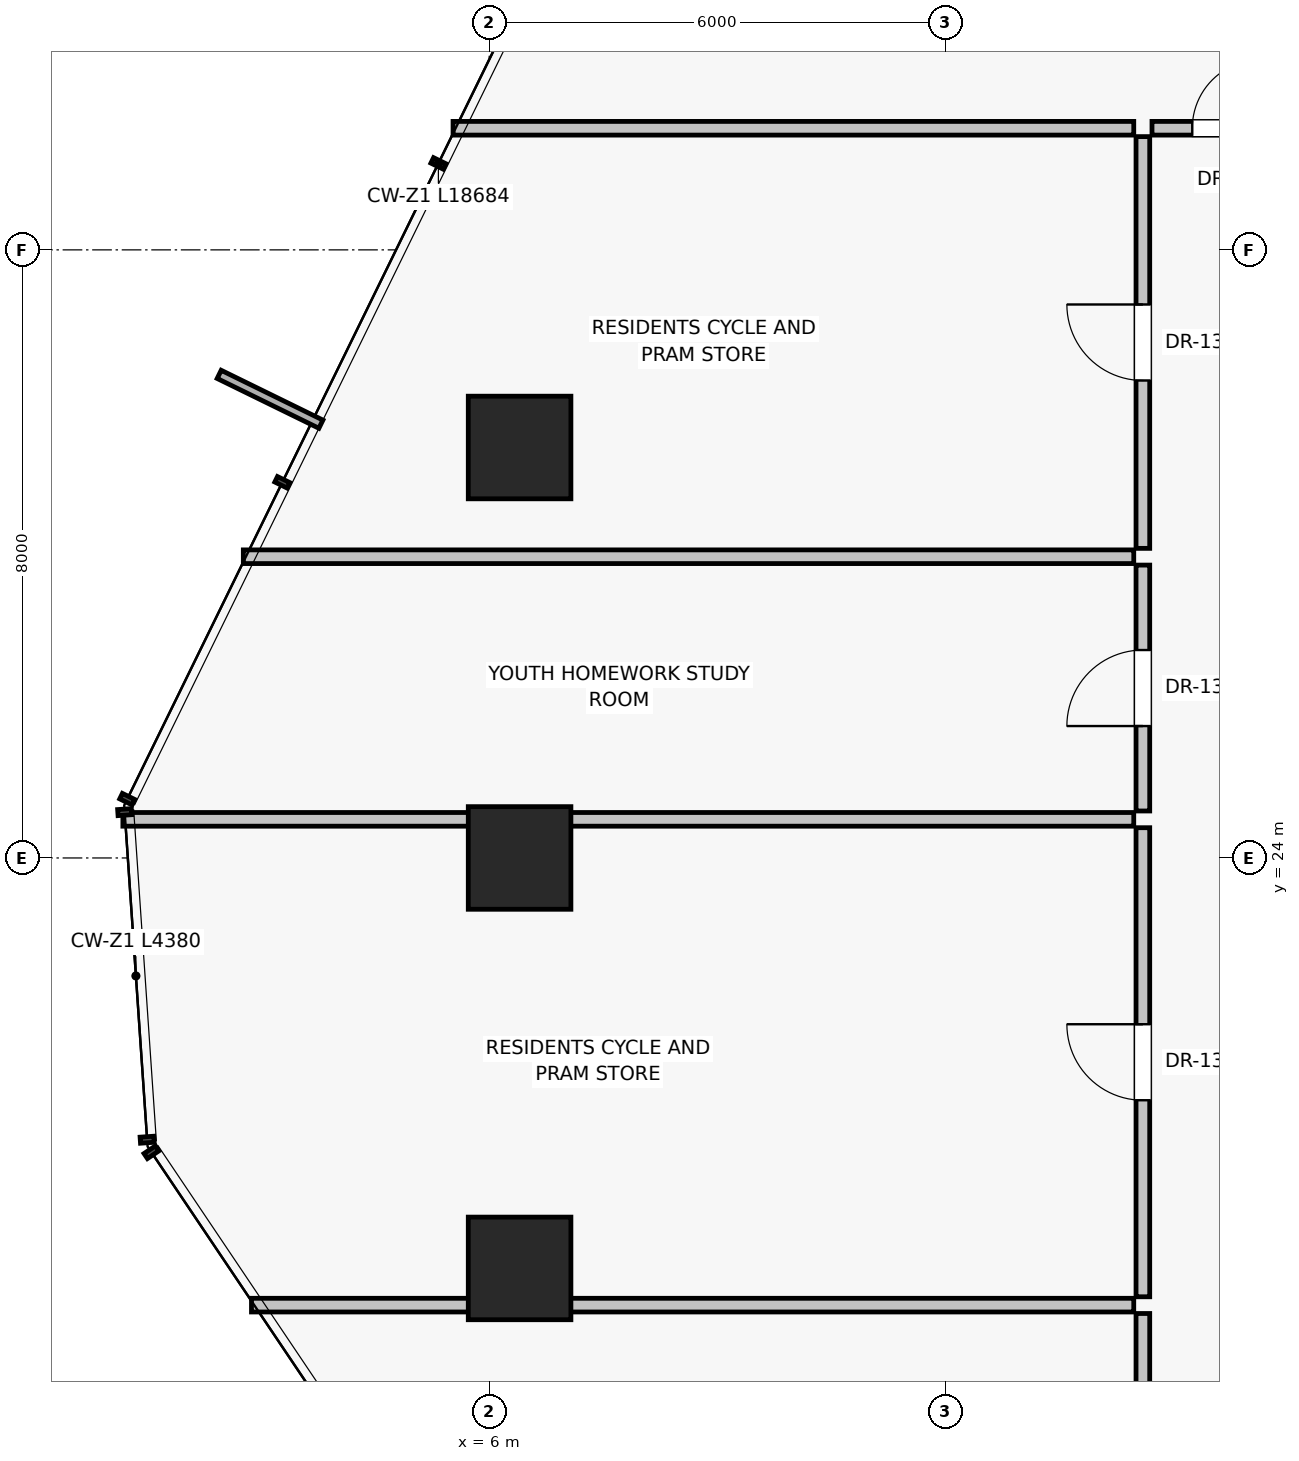
"""IFC4 building model, lengths in metres.
Left out: names, types, materials, properties, quantities, classifications, styles, units other than length and angle.
Written with IfcOpenShell. Run it as: python <this file> out.ifc"""

import sys

from ifc_helpers import new_model, si_unit, direction, frame, frame_2d, origin, origin_2d, place, context, subcontext, project, spatial, rectangle, extrude, source, transform, mapped, element, fill, save


model = new_model("IFC4")
c1 = context("Model", 3, precision=1e-05, world=origin(), true_north=direction((0.0, 1.0)))
c2 = subcontext(c1, "Body", "Model", "MODEL_VIEW")
j1 = project(units=[si_unit("LENGTHUNIT", "METRE"), si_unit("PLANEANGLEUNIT", "RADIAN")], contexts=[c1])
p1 = place(None, origin())
s1 = spatial("IfcSite", under=j1, at=p1, CompositionType="ELEMENT")
p2 = place(p1, origin())
s2 = spatial("IfcBuilding", under=s1, at=p2, CompositionType="ELEMENT")
p3 = place(p2, frame((0.0, 0.0, 37.05)))
s3 = spatial("IfcBuildingStorey", under=s2, at=p3, CompositionType="ELEMENT", Elevation=37.05)
for number, where, z_axis, x_axis in (
    (1, (6.4, 29.4, 0.0), (0.0, 0.0, 1.0), (1.0, 0.0, 0.0)),
    (2, (6.4, 24.0, 0.0), (0.0, 0.0, 1.0), (1.0, 0.0, 0.0)),
    (3, (6.4, 18.6, 0.0), (0.0, 0.0, 1.0), (1.0, 0.0, 0.0)),
):
    element("IfcColumn", number, at=place(p3, frame(where, z_axis=z_axis, x_axis=x_axis)), inside=s3, PredefinedType="COLUMN", context=c2, shape_type="SweptSolid", body=[
        extrude(rectangle(XDim=1.35, YDim=1.35, at=origin_2d()), origin(), (0.0, 0.0, 1.0), 3.25),
    ])
p4 = place(p3, frame((14.48, 33.6, 0.0), z_axis=(0.0, 0.0, 1.0), x_axis=(-1.0, 0.0, 0.0)))
e4 = element("IfcWall", 4, at=p4, inside=s3, PredefinedType="PARTITIONING", context=c2, shape_type="SweptSolid", body=[
    extrude(rectangle(XDim=8.955, YDim=0.18, at=frame_2d((4.478, 0.0))), origin(), (0.0, 0.0, 1.0), 3.0),
])
p5 = place(p3, frame((14.6, 14.31, 0.0), z_axis=(0.0, 0.0, 1.0), x_axis=(0.0, 1.0, 0.0)))
e5 = element("IfcWall", 5, at=p5, inside=s3, PredefinedType="PARTITIONING", context=c2, shape_type="SweptSolid", body=[
    extrude(rectangle(XDim=3.697, YDim=0.18, at=frame_2d((1.849, 0.0))), origin(), (0.0, 0.0, 1.0), 3.0),
])
p6 = place(p5, frame((1.348, 0.0, 0.0)))
e6 = element("IfcOpeningElement", 6, at=p6, cuts=e5, PredefinedType="OPENING", context=c2, shape_type="SweptSolid", body=[
    extrude(rectangle(XDim=1.0, YDim=2.01, at=frame_2d((0.5, 1.005))), frame((0.0, 0.1, 0.0), z_axis=(0.0, -1.0, 0.0), x_axis=(1.0, 0.0, 0.0)), (0.0, 0.0, 1.0), 0.2),
])
p7 = place(p3, frame((14.6, 18.227, 0.0), z_axis=(0.0, 0.0, 1.0), x_axis=(0.0, 1.0, 0.0)))
e7 = element("IfcWall", 7, at=p7, inside=s3, PredefinedType="PARTITIONING", context=c2, shape_type="SweptSolid", body=[
    extrude(rectangle(XDim=6.171, YDim=0.18, at=frame_2d((3.085, 0.0))), origin(), (0.0, 0.0, 1.0), 3.0),
])
p8 = place(p7, frame((2.585, 0.0, 0.0)))
e8 = element("IfcOpeningElement", 8, at=p8, cuts=e7, PredefinedType="OPENING", context=c2, shape_type="SweptSolid", body=[
    extrude(rectangle(XDim=1.0, YDim=2.01, at=frame_2d((0.5, 1.005))), frame((0.0, 0.1, 0.0), z_axis=(0.0, -1.0, 0.0), x_axis=(1.0, 0.0, 0.0)), (0.0, 0.0, 1.0), 0.2),
])
p9 = place(p3, frame((14.48, 18.117, 0.0), z_axis=(0.0, 0.0, 1.0), x_axis=(-1.0, 0.0, 0.0)))
e9 = element("IfcWall", 9, at=p9, inside=s3, PredefinedType="PARTITIONING", context=c2, shape_type="SweptSolid", body=[
    extrude(rectangle(XDim=11.607, YDim=0.18, at=frame_2d((5.804, 0.0))), origin(), (0.0, 0.0, 1.0), 2.299),
])
p10 = place(p3, frame((14.48, 24.508, 0.0), z_axis=(0.0, 0.0, 1.0), x_axis=(-1.0, 0.0, 0.0)))
e10 = element("IfcWall", 10, at=p10, inside=s3, PredefinedType="PARTITIONING", context=c2, shape_type="SweptSolid", body=[
    extrude(rectangle(XDim=13.299, YDim=0.18, at=frame_2d((6.649, 0.0))), origin(), (0.0, 0.0, 1.0), 3.0),
])
p11 = place(p3, frame((14.6, 24.618, 0.0), z_axis=(0.0, 0.0, 1.0), x_axis=(0.0, 1.0, 0.0)))
e11 = element("IfcWall", 11, at=p11, inside=s3, PredefinedType="PARTITIONING", context=c2, shape_type="SweptSolid", body=[
    extrude(rectangle(XDim=3.235, YDim=0.18, at=frame_2d((1.618, 0.0))), origin(), (0.0, 0.0, 1.0), 3.0),
])
p12 = place(p11, frame((1.117, 0.0, 0.0)))
e12 = element("IfcOpeningElement", 12, at=p12, cuts=e11, PredefinedType="OPENING", context=c2, shape_type="SweptSolid", body=[
    extrude(rectangle(XDim=1.0, YDim=2.01, at=frame_2d((0.5, 1.005))), frame((0.0, 0.1, 0.0), z_axis=(0.0, -1.0, 0.0), x_axis=(1.0, 0.0, 0.0)), (0.0, 0.0, 1.0), 0.2),
])
p13 = place(p3, frame((14.6, 28.073, 0.0), z_axis=(0.0, 0.0, 1.0), x_axis=(0.0, 1.0, 0.0)))
e13 = element("IfcWall", 13, at=p13, inside=s3, PredefinedType="PARTITIONING", context=c2, shape_type="SweptSolid", body=[
    extrude(rectangle(XDim=5.417, YDim=0.18, at=frame_2d((2.708, 0.0))), origin(), (0.0, 0.0, 1.0), 3.0),
])
p14 = place(p13, frame((2.208, 0.0, 0.0)))
e14 = element("IfcOpeningElement", 14, at=p14, cuts=e13, PredefinedType="OPENING", context=c2, shape_type="SweptSolid", body=[
    extrude(rectangle(XDim=1.0, YDim=2.01, at=frame_2d((0.5, 1.005))), frame((0.0, 0.1, 0.0), z_axis=(0.0, -1.0, 0.0), x_axis=(1.0, 0.0, 0.0)), (0.0, 0.0, 1.0), 0.2),
])
p15 = place(p3, frame((14.48, 27.963, 0.0), z_axis=(0.0, 0.0, 1.0), x_axis=(-1.0, 0.0, 0.0)))
e15 = element("IfcWall", 15, at=p15, inside=s3, PredefinedType="PARTITIONING", context=c2, shape_type="SweptSolid", body=[
    extrude(rectangle(XDim=11.715, YDim=0.18, at=frame_2d((5.857, 0.0))), origin(), (0.0, 0.0, 1.0), 3.0),
])
p16 = place(p3, frame((14.72, 33.6, 0.0), z_axis=(0.0, 0.0, 1.0), x_axis=(1.0, 0.0, 0.0)))
e16 = element("IfcWall", 16, at=p16, inside=s3, PredefinedType="PARTITIONING", context=c2, shape_type="SweptSolid", body=[
    extrude(rectangle(XDim=1.96, YDim=0.18, at=frame_2d((0.98, 0.0))), origin(), (0.0, 0.0, 1.0), 3.0),
])
p17 = place(p16, frame((0.53, 0.0, 0.0)))
e17 = element("IfcOpeningElement", 17, at=p17, cuts=e16, PredefinedType="OPENING", context=c2, shape_type="SweptSolid", body=[
    extrude(rectangle(XDim=0.9, YDim=2.01, at=frame_2d((0.45, 1.005))), frame((0.0, 0.1, 0.0), z_axis=(0.0, -1.0, 0.0), x_axis=(1.0, 0.0, 0.0)), (0.0, 0.0, 1.0), 0.2),
])
m1 = source(origin(), c2, "Body", "SweptSolid", [
    extrude(rectangle(XDim=1.0, YDim=2.01, at=frame_2d((0.5, 1.005))), frame((0.0, 0.025, 0.0), z_axis=(0.0, -1.0, 0.0), x_axis=(1.0, 0.0, 0.0)), (0.0, 0.0, 1.0), 0.05),
])
p18 = place(p8, origin())
e18 = element("IfcDoor", 18, at=p18, inside=s3, OperationType="SINGLE_SWING_RIGHT", PredefinedType="DOOR", context=c2, shape_type="MappedRepresentation", body=[
    mapped(m1, transform((0.0, 0.0, 0.0), scale=1.0)),
])
fill(e8, e18)
p19 = place(p12, origin())
e19 = element("IfcDoor", 19, at=p19, inside=s3, OperationType="SINGLE_SWING_LEFT", PredefinedType="DOOR", context=c2, shape_type="MappedRepresentation", body=[
    mapped(m1, transform((0.0, 0.0, 0.0), scale=1.0)),
])
fill(e12, e19)
p20 = place(p14, origin())
e20 = element("IfcDoor", 20, at=p20, inside=s3, OperationType="SINGLE_SWING_RIGHT", PredefinedType="DOOR", context=c2, shape_type="MappedRepresentation", body=[
    mapped(m1, transform((0.0, 0.0, 0.0), scale=1.0)),
])
fill(e14, e20)
m2 = source(origin(), c2, "Body", "SweptSolid", [
    extrude(rectangle(XDim=0.9, YDim=2.01, at=frame_2d((0.45, 1.005))), frame((0.0, 0.025, 0.0), z_axis=(0.0, -1.0, 0.0), x_axis=(1.0, 0.0, 0.0)), (0.0, 0.0, 1.0), 0.05),
])
p21 = place(p17, origin())
e21 = element("IfcDoor", 21, at=p21, inside=s3, OperationType="SINGLE_SWING_RIGHT", PredefinedType="DOOR", context=c2, shape_type="MappedRepresentation", body=[
    mapped(m2, transform((0.0, 0.0, 0.0), scale=1.0)),
])
fill(e17, e21)
save(model, sys.argv[1])
